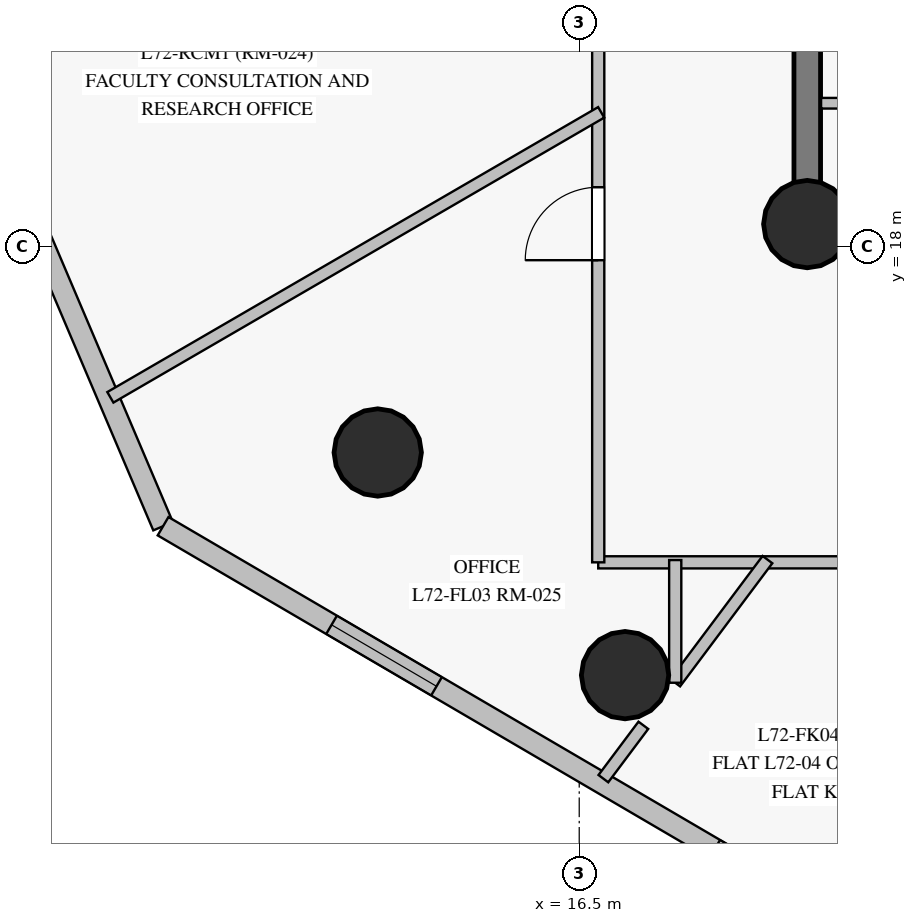
"""IFC4 building model, lengths in metres.
Left out: names, types, materials, properties, quantities, classifications, styles, units other than length and angle.
Written with IfcOpenShell. Run it as: python <this file> out.ifc"""

import sys

from ifc_helpers import new_model, si_unit, direction, frame, frame_2d, origin, origin_with_axes, origin_2d, place, context, subcontext, project, spatial, rectangle, circle, extrude, source, transform, mapped, element, fill, save


model = new_model("IFC4")
c1 = context("Model", 3, precision=1e-05, world=origin(), true_north=direction((0.0, 1.0)))
c2 = subcontext(c1, "Body", "Model", "MODEL_VIEW")
j1 = project(units=[si_unit("LENGTHUNIT", "METRE"), si_unit("PLANEANGLEUNIT", "RADIAN")], contexts=[c1])
p1 = place(None, origin())
s1 = spatial("IfcSite", under=j1, at=p1, CompositionType="ELEMENT")
p2 = place(p1, origin())
s2 = spatial("IfcBuilding", under=s1, at=p2, CompositionType="ELEMENT")
p3 = place(p2, frame((0.0, 0.0, 244.35)))
s3 = spatial("IfcBuildingStorey", under=s2, at=p3, CompositionType="ELEMENT", Elevation=244.35)
p4 = place(p3, frame((19.5, 18.3, 0.0), z_axis=(0.0, 0.0, 1.0), x_axis=(1.0, 0.0, 0.0)))
e1 = element("IfcWall", 1, at=p4, inside=s3, PredefinedType="SHEAR", context=c2, shape_type="SweptSolid", body=[
    extrude(rectangle(XDim=7.05, YDim=0.35, at=frame_2d((3.525, 0.0))), origin(), (0.0, 0.0, 1.0), 2.85),
])
p5 = place(p4, frame((4.2, 0.0, 0.0)))
e2 = element("IfcOpeningElement", 2, at=p5, cuts=e1, PredefinedType="OPENING", context=c2, shape_type="SweptSolid", body=[
    extrude(rectangle(XDim=1.4, YDim=2.2, at=frame_2d((0.7, 1.1))), frame((0.0, 0.185, 0.0), z_axis=(0.0, -1.0, 0.0), x_axis=(1.0, 0.0, 0.0)), (0.0, 0.0, 1.0), 0.37),
])
p6 = place(p3, frame((19.5, 34.7, 0.0), z_axis=(0.0, 0.0, 1.0), x_axis=(0.0, -1.0, 0.0)))
e3 = element("IfcWall", 3, at=p6, inside=s3, PredefinedType="SHEAR", context=c2, shape_type="SweptSolid", body=[
    extrude(rectangle(XDim=16.4, YDim=0.35, at=frame_2d((8.2, 0.0))), origin(), (0.0, 0.0, 1.0), 2.85),
])
p7 = place(p6, frame((3.24, 0.0, 0.0)))
e4 = element("IfcOpeningElement", 4, at=p7, cuts=e3, PredefinedType="OPENING", context=c2, shape_type="SweptSolid", body=[
    extrude(rectangle(XDim=1.1, YDim=2.15, at=frame_2d((0.55, 1.075))), frame((0.0, 0.185, 0.0), z_axis=(0.0, -1.0, 0.0), x_axis=(1.0, 0.0, 0.0)), (0.0, 0.0, 1.0), 0.37),
])
m1 = source(origin_with_axes(), c2, "Body", "SweptSolid", [
    extrude(circle(Radius=0.575, at=origin_2d()), origin(), (0.0, 0.0, 1.0), 3.05),
])
for number, where, z_axis, x_axis in (
    (5, (19.5, 18.3, 0.0), (0.0, 0.0, 1.0), (1.0, 0.0, 0.0)),
    (6, (13.849, 15.295, 0.0), (0.0, 0.0, 1.0), (1.0, 0.0, 0.0)),
    (7, (17.103, 12.366, 0.0), (0.0, 0.0, 1.0), (1.0, 0.0, 0.0)),
):
    element("IfcColumn", number, at=place(p3, frame(where, z_axis=z_axis, x_axis=x_axis)), inside=s3, PredefinedType="COLUMN", context=c2, shape_type="MappedRepresentation", body=[
        mapped(m1, transform((0.0, 0.0, 0.0), scale=1.0)),
    ])
p8 = place(p3, frame((7.609, 22.358, 0.0), z_axis=(0.0, 0.0, 1.0), x_axis=(0.391369236154, -0.920233731718, 0.0)))
e8 = element("IfcWall", 8, at=p8, inside=s3, PredefinedType="SOLIDWALL", context=c2, shape_type="SweptSolid", body=[
    extrude(rectangle(XDim=8.729, YDim=0.28, at=frame_2d((4.365, 0.0))), origin(), (0.0, 0.0, 1.0), 2.85),
])
p9 = place(p8, frame((2.677, 0.0, 0.85)))
e9 = element("IfcOpeningElement", 9, at=p9, cuts=e8, PredefinedType="OPENING", context=c2, shape_type="SweptSolid", body=[
    extrude(rectangle(XDim=1.6, YDim=1.6, at=frame_2d((0.8, 0.8))), frame((0.0, 0.15, 0.0), z_axis=(0.0, -1.0, 0.0), x_axis=(1.0, 0.0, 0.0)), (0.0, 0.0, 1.0), 0.3),
])
p10 = place(p3, frame((11.025, 14.325, 0.0), z_axis=(0.0, 0.0, 1.0), x_axis=(0.863011829574, -0.505183711154, 0.0)))
e10 = element("IfcWall", 10, at=p10, inside=s3, PredefinedType="SOLIDWALL", context=c2, shape_type="SweptSolid", body=[
    extrude(rectangle(XDim=11.802, YDim=0.28, at=frame_2d((5.901, 0.0))), origin(), (0.0, 0.0, 1.0), 2.85),
])
p11 = place(p10, frame((2.569, 0.0, 0.85)))
e11 = element("IfcOpeningElement", 11, at=p11, cuts=e10, PredefinedType="OPENING", context=c2, shape_type="SweptSolid", body=[
    extrude(rectangle(XDim=1.6, YDim=1.6, at=frame_2d((0.8, 0.8))), frame((0.0, 0.15, 0.0), z_axis=(0.0, -1.0, 0.0), x_axis=(1.0, 0.0, 0.0)), (0.0, 0.0, 1.0), 0.3),
])
p12 = place(p10, frame((8.409, 0.0, 0.85)))
e12 = element("IfcOpeningElement", 12, at=p12, cuts=e10, PredefinedType="OPENING", context=c2, shape_type="SweptSolid", body=[
    extrude(rectangle(XDim=1.6, YDim=1.6, at=frame_2d((0.8, 0.8))), frame((0.0, 0.15, 0.0), z_axis=(0.0, -1.0, 0.0), x_axis=(1.0, 0.0, 0.0)), (0.0, 0.0, 1.0), 0.3),
])
p13 = place(p3, frame((41.8, 13.85, 0.0), z_axis=(0.0, 0.0, 1.0), x_axis=(-1.0, 0.0, 0.0)))
e13 = element("IfcWall", 13, at=p13, inside=s3, PredefinedType="PARTITIONING", context=c2, shape_type="SweptSolid", body=[
    extrude(rectangle(XDim=25.05, YDim=0.16, at=frame_2d((12.525, 0.0))), origin(), (0.0, 0.0, 1.0), 2.3),
])
p14 = place(p13, frame((19.83, 0.0, 0.0)))
e14 = element("IfcOpeningElement", 14, at=p14, cuts=e13, PredefinedType="OPENING", context=c2, shape_type="SweptSolid", body=[
    extrude(rectangle(XDim=0.96, YDim=2.15, at=frame_2d((0.48, 1.075))), frame((0.0, 0.09, 0.0), z_axis=(0.0, -1.0, 0.0), x_axis=(1.0, 0.0, 0.0)), (0.0, 0.0, 1.0), 0.18),
])
p15 = place(p13, frame((10.355, 0.0, 0.0)))
e15 = element("IfcOpeningElement", 15, at=p15, cuts=e13, PredefinedType="OPENING", context=c2, shape_type="SweptSolid", body=[
    extrude(rectangle(XDim=0.96, YDim=2.15, at=frame_2d((0.48, 1.075))), frame((0.0, 0.09, 0.0), z_axis=(0.0, -1.0, 0.0), x_axis=(1.0, 0.0, 0.0)), (0.0, 0.0, 1.0), 0.18),
])
p16 = place(p13, frame((5.788, 0.0, 0.0)))
e16 = element("IfcOpeningElement", 16, at=p16, cuts=e13, PredefinedType="OPENING", context=c2, shape_type="SweptSolid", body=[
    extrude(rectangle(XDim=0.96, YDim=2.15, at=frame_2d((0.48, 1.075))), frame((0.0, 0.09, 0.0), z_axis=(0.0, -1.0, 0.0), x_axis=(1.0, 0.0, 0.0)), (0.0, 0.0, 1.0), 0.18),
])
p17 = place(p3, frame((16.75, 13.85, 0.0), z_axis=(0.0, 0.0, 1.0), x_axis=(0.0, 1.0, 0.0)))
e17 = element("IfcWall", 17, at=p17, inside=s3, PredefinedType="PARTITIONING", context=c2, shape_type="SweptSolid", body=[
    extrude(rectangle(XDim=17.8, YDim=0.16, at=frame_2d((8.9, 0.0))), origin(), (0.0, 0.0, 1.0), 2.45),
])
p18 = place(p17, frame((15.7, 0.0, 0.0)))
e18 = element("IfcOpeningElement", 18, at=p18, cuts=e17, PredefinedType="OPENING", context=c2, shape_type="SweptSolid", body=[
    extrude(rectangle(XDim=0.96, YDim=2.15, at=frame_2d((0.48, 1.075))), frame((0.0, 0.09, 0.0), z_axis=(0.0, -1.0, 0.0), x_axis=(1.0, 0.0, 0.0)), (0.0, 0.0, 1.0), 0.18),
])
p19 = place(p17, frame((10.805, 0.0, 0.0)))
e19 = element("IfcOpeningElement", 19, at=p19, cuts=e17, PredefinedType="OPENING", context=c2, shape_type="SweptSolid", body=[
    extrude(rectangle(XDim=0.96, YDim=2.15, at=frame_2d((0.48, 1.075))), frame((0.0, 0.09, 0.0), z_axis=(0.0, -1.0, 0.0), x_axis=(1.0, 0.0, 0.0)), (0.0, 0.0, 1.0), 0.18),
])
p20 = place(p17, frame((8.425, 0.0, 0.0)))
e20 = element("IfcOpeningElement", 20, at=p20, cuts=e17, PredefinedType="OPENING", context=c2, shape_type="SweptSolid", body=[
    extrude(rectangle(XDim=0.96, YDim=2.15, at=frame_2d((0.48, 1.075))), frame((0.0, 0.09, 0.0), z_axis=(0.0, -1.0, 0.0), x_axis=(1.0, 0.0, 0.0)), (0.0, 0.0, 1.0), 0.18),
])
p21 = place(p17, frame((3.975, 0.0, 0.0)))
e21 = element("IfcOpeningElement", 21, at=p21, cuts=e17, PredefinedType="OPENING", context=c2, shape_type="SweptSolid", body=[
    extrude(rectangle(XDim=0.96, YDim=2.15, at=frame_2d((0.48, 1.075))), frame((0.0, 0.09, 0.0), z_axis=(0.0, -1.0, 0.0), x_axis=(1.0, 0.0, 0.0)), (0.0, 0.0, 1.0), 0.18),
])
p22 = place(p3, frame((16.789, 19.77, 0.0), z_axis=(0.0, 0.0, 1.0), x_axis=(-0.864795816659, -0.502123685449, 0.0)))
e22 = element("IfcWall", 22, at=p22, inside=s3, PredefinedType="PARTITIONING", context=c2, shape_type="SweptSolid", body=[
    extrude(rectangle(XDim=7.467, YDim=0.16, at=frame_2d((3.733, 0.0))), origin(), (0.0, 0.0, 1.0), 2.85),
])
p23 = place(p3, frame((19.682, 19.89, 0.0), z_axis=(0.0, 0.0, 1.0), x_axis=(1.0, 0.0, 0.0)))
e23 = element("IfcWall", 23, at=p23, inside=s3, PredefinedType="PARTITIONING", context=c2, shape_type="SweptSolid", body=[
    extrude(rectangle(XDim=3.815, YDim=0.14, at=frame_2d((1.908, 0.0))), origin(), (0.0, 0.0, 1.0), 2.85),
])
p24 = place(p3, frame((18.977, 13.886, 0.0), z_axis=(0.0, 0.0, 1.0), x_axis=(-0.599536769063, -0.80034721374, 0.0)))
e24 = element("IfcWall", 24, at=p24, inside=s3, PredefinedType="PARTITIONING", context=c2, shape_type="SweptSolid", body=[
    extrude(rectangle(XDim=2.024, YDim=0.16, at=frame_2d((1.012, 0.0))), origin(), (0.0, 0.0, 1.0), 2.35),
])
p25 = place(p3, frame((17.763, 12.266, 0.0), z_axis=(0.0, 0.0, 1.0), x_axis=(0.0, 1.0, 0.0)))
e25 = element("IfcWall", 25, at=p25, inside=s3, PredefinedType="PARTITIONING", context=c2, shape_type="SweptSolid", body=[
    extrude(rectangle(XDim=1.614, YDim=0.16, at=frame_2d((0.807, 0.0))), origin(), (0.0, 0.0, 1.0), 2.35),
])
p26 = place(p3, frame((17.344, 11.706, 0.0), z_axis=(0.0, 0.0, 1.0), x_axis=(-0.599420746123, -0.800434112914, 0.0)))
e26 = element("IfcWall", 26, at=p26, inside=s3, PredefinedType="PARTITIONING", context=c2, shape_type="SweptSolid", body=[
    extrude(rectangle(XDim=0.877, YDim=0.16, at=frame_2d((0.438, 0.0))), origin(), (0.0, 0.0, 1.0), 2.85),
])
m2 = source(origin_with_axes(), c2, "Body", "SweptSolid", [
    extrude(rectangle(XDim=1.6, YDim=1.6, at=frame_2d((0.8, 0.8))), frame((0.0, 0.03, 0.0), z_axis=(0.0, -1.0, 0.0), x_axis=(1.0, 0.0, 0.0)), (0.0, 0.0, 1.0), 0.06),
])
p27 = place(p11, origin())
e27 = element("IfcWindow", 27, at=p27, inside=s3, PartitioningType="SINGLE_PANEL", PredefinedType="WINDOW", context=c2, shape_type="MappedRepresentation", body=[
    mapped(m2, transform((0.0, 0.0, 0.0), scale=1.0)),
])
fill(e11, e27)
m3 = source(origin_with_axes(), c2, "Body", "SweptSolid", [
    extrude(rectangle(XDim=0.96, YDim=2.15, at=frame_2d((0.48, 1.075))), frame((0.0, 0.025, 0.0), z_axis=(0.0, -1.0, 0.0), x_axis=(1.0, 0.0, 0.0)), (0.0, 0.0, 1.0), 0.05),
])
p28 = place(p21, origin())
e28 = element("IfcDoor", 28, at=p28, inside=s3, OperationType="SINGLE_SWING_LEFT", PredefinedType="DOOR", context=c2, shape_type="MappedRepresentation", body=[
    mapped(m3, transform((0.0, 0.0, 0.0), scale=1.0)),
])
fill(e21, e28)
save(model, sys.argv[1])
